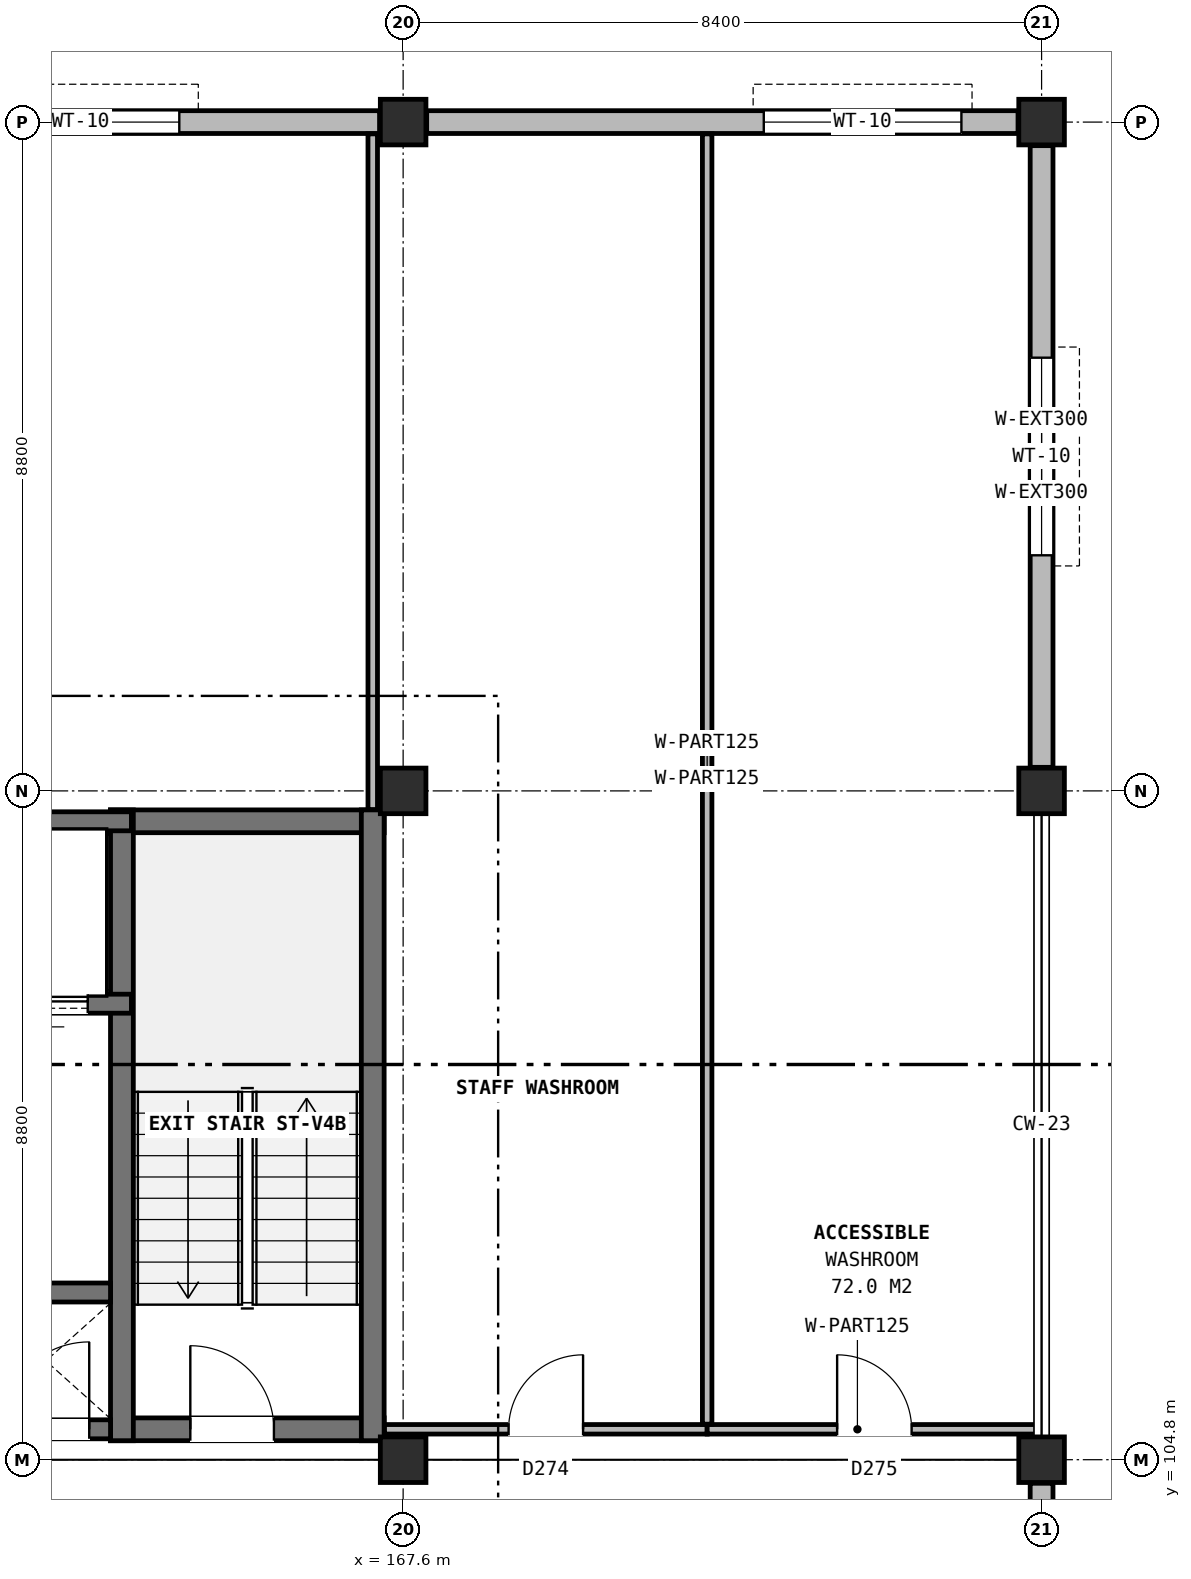
"""IFC4 building model, lengths in metres.
Left out: names, types, materials, properties, quantities, classifications, styles, units other than length and angle.
Written with IfcOpenShell. Run it as: python <this file> out.ifc"""

import sys

from ifc_helpers import new_model, si_unit, direction, frame, frame_2d, origin, origin_2d, place, context, subcontext, project, spatial, rectangle, extrude, element, fill, save


model = new_model("IFC4")
c1 = context("Model", 3, precision=1e-05, world=origin(), true_north=direction((0.0, 1.0)))
c2 = subcontext(c1, "Body", "Model", "MODEL_VIEW")
j1 = project(units=[si_unit("LENGTHUNIT", "METRE"), si_unit("PLANEANGLEUNIT", "RADIAN")], contexts=[c1])
p1 = place(None, origin())
s1 = spatial("IfcSite", under=j1, at=p1, CompositionType="ELEMENT")
p2 = place(p1, origin())
s2 = spatial("IfcBuilding", under=s1, at=p2, CompositionType="ELEMENT")
p3 = place(p2, frame((0.0, 0.0, 56.0)))
s3 = spatial("IfcBuildingStorey", under=s2, at=p3, CompositionType="ELEMENT", Elevation=56.0)
for number, where, z_axis, x_axis in (
    (1, (167.6, 104.8, 0.0), (0.0, 0.0, 1.0), (1.0, 0.0, 0.0)),
    (2, (167.6, 113.6, 0.0), (0.0, 0.0, 1.0), (1.0, 0.0, 0.0)),
    (3, (167.6, 122.4, 0.0), (0.0, 0.0, 1.0), (1.0, 0.0, 0.0)),
    (4, (176.0, 104.8, 0.0), (0.0, 0.0, 1.0), (1.0, 0.0, 0.0)),
    (5, (176.0, 113.6, 0.0), (0.0, 0.0, 1.0), (1.0, 0.0, 0.0)),
    (6, (176.0, 122.4, 0.0), (0.0, 0.0, 1.0), (1.0, 0.0, 0.0)),
):
    element("IfcColumn", number, at=place(p3, frame(where, z_axis=z_axis, x_axis=x_axis)), inside=s3, PredefinedType="COLUMN", context=c2, shape_type="SweptSolid", body=[
        extrude(rectangle(XDim=0.6, YDim=0.6, at=origin_2d()), origin(), (0.0, 0.0, 1.0), 3.8),
    ])
p4 = place(p3, frame((176.0, 96.31, 0.0), z_axis=(0.0, 0.0, 1.0), x_axis=(0.0, 1.0, 0.0)))
e7 = element("IfcWall", 7, at=p4, inside=s3, PredefinedType="SOLIDWALL", context=c2, shape_type="SweptSolid", body=[
    extrude(rectangle(XDim=8.18, YDim=0.3, at=frame_2d((4.09, 0.0))), origin(), (0.0, 0.0, 1.0), 3.05),
])
p5 = place(p4, frame((1.745, 0.0, 0.9)))
e8 = element("IfcOpeningElement", 8, at=p5, cuts=e7, PredefinedType="OPENING", context=c2, shape_type="SweptSolid", body=[
    extrude(rectangle(XDim=2.6, YDim=2.0, at=frame_2d((1.3, 1.0))), frame((0.0, 0.16, 0.0), z_axis=(0.0, -1.0, 0.0), x_axis=(1.0, 0.0, 0.0)), (0.0, 0.0, 1.0), 0.32),
])
p6 = place(p3, frame((176.0, 113.91, 0.0), z_axis=(0.0, 0.0, 1.0), x_axis=(0.0, 1.0, 0.0)))
e9 = element("IfcWall", 9, at=p6, inside=s3, PredefinedType="SOLIDWALL", context=c2, shape_type="SweptSolid", body=[
    extrude(rectangle(XDim=8.18, YDim=0.3, at=frame_2d((4.09, 0.0))), origin(), (0.0, 0.0, 1.0), 3.05),
])
p7 = place(p6, frame((2.79, 0.0, 0.9)))
e10 = element("IfcOpeningElement", 10, at=p7, cuts=e9, PredefinedType="OPENING", context=c2, shape_type="SweptSolid", body=[
    extrude(rectangle(XDim=2.6, YDim=2.0, at=frame_2d((1.3, 1.0))), frame((0.0, 0.16, 0.0), z_axis=(0.0, -1.0, 0.0), x_axis=(1.0, 0.0, 0.0)), (0.0, 0.0, 1.0), 0.32),
])
p8 = place(p3, frame((175.69, 122.4, 0.0), z_axis=(0.0, 0.0, 1.0), x_axis=(-1.0, 0.0, 0.0)))
e11 = element("IfcWall", 11, at=p8, inside=s3, PredefinedType="SOLIDWALL", context=c2, shape_type="SweptSolid", body=[
    extrude(rectangle(XDim=7.78, YDim=0.3, at=frame_2d((3.89, 0.0))), origin(), (0.0, 0.0, 1.0), 3.05),
])
p9 = place(p8, frame((0.745, 0.0, 0.9)))
e12 = element("IfcOpeningElement", 12, at=p9, cuts=e11, PredefinedType="OPENING", context=c2, shape_type="SweptSolid", body=[
    extrude(rectangle(XDim=2.6, YDim=2.0, at=frame_2d((1.3, 1.0))), frame((0.0, 0.16, 0.0), z_axis=(0.0, -1.0, 0.0), x_axis=(1.0, 0.0, 0.0)), (0.0, 0.0, 1.0), 0.32),
])
p10 = place(p3, frame((167.29, 122.4, 0.0), z_axis=(0.0, 0.0, 1.0), x_axis=(-1.0, 0.0, 0.0)))
e13 = element("IfcWall", 13, at=p10, inside=s3, PredefinedType="SOLIDWALL", context=c2, shape_type="SweptSolid", body=[
    extrude(rectangle(XDim=7.78, YDim=0.3, at=frame_2d((3.89, 0.0))), origin(), (0.0, 0.0, 1.0), 3.05),
])
p11 = place(p10, frame((2.635, 0.0, 0.9)))
e14 = element("IfcOpeningElement", 14, at=p11, cuts=e13, PredefinedType="OPENING", context=c2, shape_type="SweptSolid", body=[
    extrude(rectangle(XDim=2.6, YDim=2.0, at=frame_2d((1.3, 1.0))), frame((0.0, 0.16, 0.0), z_axis=(0.0, -1.0, 0.0), x_axis=(1.0, 0.0, 0.0)), (0.0, 0.0, 1.0), 0.32),
])
p12 = place(p3, frame((163.75, 105.2, 0.0), z_axis=(0.0, 0.0, 1.0), x_axis=(1.0, 0.0, 0.0)))
e15 = element("IfcWall", 15, at=p12, inside=s3, PredefinedType="SHEAR", context=c2, shape_type="SweptSolid", body=[
    extrude(rectangle(XDim=3.6, YDim=0.3, at=frame_2d((1.8, 0.0))), origin(), (0.0, 0.0, 1.0), 3.8),
])
p13 = place(p12, frame((1.05, 0.0, 0.0)))
e16 = element("IfcOpeningElement", 16, at=p13, cuts=e15, PredefinedType="OPENING", context=c2, shape_type="SweptSolid", body=[
    extrude(rectangle(XDim=1.1, YDim=2.2, at=frame_2d((0.55, 1.1))), frame((0.0, 0.16, 0.0), z_axis=(0.0, -1.0, 0.0), x_axis=(1.0, 0.0, 0.0)), (0.0, 0.0, 1.0), 0.32),
])
p14 = place(p3, frame((163.75, 113.2, 0.0), z_axis=(0.0, 0.0, 1.0), x_axis=(1.0, 0.0, 0.0)))
e17 = element("IfcWall", 17, at=p14, inside=s3, PredefinedType="SHEAR", context=c2, shape_type="SweptSolid", body=[
    extrude(rectangle(XDim=3.6, YDim=0.3, at=frame_2d((1.8, 0.0))), origin(), (0.0, 0.0, 1.0), 3.8),
])
for number, where, z_axis, x_axis in (
    (18, (163.9, 105.05, 0.0), (0.0, 0.0, 1.0), (0.0, 1.0, 0.0)),
    (19, (167.2, 105.05, 0.0), (0.0, 0.0, 1.0), (0.0, 1.0, 0.0)),
):
    element("IfcWall", number, at=place(p3, frame(where, z_axis=z_axis, x_axis=x_axis)), inside=s3, PredefinedType="SHEAR", context=c2, shape_type="SweptSolid", body=[
        extrude(rectangle(XDim=8.3, YDim=0.3, at=frame_2d((4.15, 0.0))), origin(), (0.0, 0.0, 1.0), 3.8),
    ])
p15 = place(p3, frame((161.475, 110.8, 0.0), z_axis=(0.0, 0.0, 1.0), x_axis=(1.0, 0.0, 0.0)))
e20 = element("IfcWall", 20, at=p15, inside=s3, PredefinedType="SOLIDWALL", context=c2, shape_type="SweptSolid", body=[
    extrude(rectangle(XDim=2.55, YDim=0.25, at=frame_2d((1.275, 0.0))), origin(), (0.0, 0.0, 1.0), 3.48),
])
p16 = place(p15, frame((0.575, 0.0, 0.0)))
e21 = element("IfcOpeningElement", 21, at=p16, cuts=e20, PredefinedType="OPENING", context=c2, shape_type="SweptSolid", body=[
    extrude(rectangle(XDim=1.4, YDim=2.3, at=frame_2d((0.7, 1.15))), frame((0.0, 0.135, 0.0), z_axis=(0.0, -1.0, 0.0), x_axis=(1.0, 0.0, 0.0)), (0.0, 0.0, 1.0), 0.27),
])
p17 = place(p3, frame((161.475, 113.2, 0.0), z_axis=(0.0, 0.0, 1.0), x_axis=(1.0, 0.0, 0.0)))
e22 = element("IfcWall", 22, at=p17, inside=s3, PredefinedType="SOLIDWALL", context=c2, shape_type="SweptSolid", body=[
    extrude(rectangle(XDim=2.55, YDim=0.25, at=frame_2d((1.275, 0.0))), origin(), (0.0, 0.0, 1.0), 3.48),
])
p18 = place(p3, frame((162.05, 107.0, 0.0), z_axis=(0.0, 0.0, 1.0), x_axis=(1.0, 0.0, 0.0)))
e23 = element("IfcWall", 23, at=p18, inside=s3, PredefinedType="SOLIDWALL", context=c2, shape_type="SweptSolid", body=[
    extrude(rectangle(XDim=1.7, YDim=0.25, at=frame_2d((0.85, 0.0))), origin(), (0.0, 0.0, 1.0), 3.48),
])
p19 = place(p3, frame((162.05, 105.2, 0.0), z_axis=(0.0, 0.0, 1.0), x_axis=(1.0, 0.0, 0.0)))
e24 = element("IfcWall", 24, at=p19, inside=s3, PredefinedType="SOLIDWALL", context=c2, shape_type="SweptSolid", body=[
    extrude(rectangle(XDim=1.7, YDim=0.25, at=frame_2d((0.85, 0.0))), origin(), (0.0, 0.0, 1.0), 3.48),
])
p20 = place(p19, frame((0.27, 0.0, 0.0)))
e25 = element("IfcOpeningElement", 25, at=p20, cuts=e24, PredefinedType="OPENING", context=c2, shape_type="SweptSolid", body=[
    extrude(rectangle(XDim=1.15, YDim=2.2, at=frame_2d((0.575, 1.1))), frame((0.0, 0.135, 0.0), z_axis=(0.0, -1.0, 0.0), x_axis=(1.0, 0.0, 0.0)), (0.0, 0.0, 1.0), 0.27),
])
p21 = place(p3, frame((167.355, 105.2, 0.0), z_axis=(0.0, 0.0, 1.0), x_axis=(1.0, 0.0, 0.0)))
e26 = element("IfcWall", 26, at=p21, inside=s3, PredefinedType="PARTITIONING", context=c2, shape_type="SweptSolid", body=[
    extrude(rectangle(XDim=4.245, YDim=0.125, at=frame_2d((2.123, 0.0))), origin(), (0.0, 0.0, 1.0), 3.045),
])
p22 = place(p21, frame((1.633, 0.0, 0.0)))
e27 = element("IfcOpeningElement", 27, at=p22, cuts=e26, PredefinedType="OPENING", context=c2, shape_type="SweptSolid", body=[
    extrude(rectangle(XDim=0.98, YDim=2.1, at=frame_2d((0.49, 1.05))), frame((0.0, 0.073, 0.0), z_axis=(0.0, -1.0, 0.0), x_axis=(1.0, 0.0, 0.0)), (0.0, 0.0, 1.0), 0.145),
])
p23 = place(p3, frame((171.6, 105.2, 0.0), z_axis=(0.0, 0.0, 1.0), x_axis=(1.0, 0.0, 0.0)))
e28 = element("IfcWall", 28, at=p23, inside=s3, PredefinedType="PARTITIONING", context=c2, shape_type="SweptSolid", body=[
    extrude(rectangle(XDim=4.4, YDim=0.125, at=frame_2d((2.2, 0.0))), origin(), (0.0, 0.0, 1.0), 3.045),
])
p24 = place(p23, frame((1.71, 0.0, 0.0)))
e29 = element("IfcOpeningElement", 29, at=p24, cuts=e28, PredefinedType="OPENING", context=c2, shape_type="SweptSolid", body=[
    extrude(rectangle(XDim=0.98, YDim=2.1, at=frame_2d((0.49, 1.05))), frame((0.0, 0.073, 0.0), z_axis=(0.0, -1.0, 0.0), x_axis=(1.0, 0.0, 0.0)), (0.0, 0.0, 1.0), 0.145),
])
p25 = place(p3, frame((167.2, 113.355, 0.0), z_axis=(0.0, 0.0, 1.0), x_axis=(0.0, 1.0, 0.0)))
e30 = element("IfcWall", 30, at=p25, inside=s3, PredefinedType="PARTITIONING", context=c2, shape_type="SweptSolid", body=[
    extrude(rectangle(XDim=8.89, YDim=0.125, at=frame_2d((4.445, 0.0))), origin(), (0.0, 0.0, 1.0), 3.045),
])
p26 = place(p3, frame((171.6, 105.268, 0.0), z_axis=(0.0, 0.0, 1.0), x_axis=(0.0, 1.0, 0.0)))
e31 = element("IfcWall", 31, at=p26, inside=s3, PredefinedType="PARTITIONING", context=c2, shape_type="SweptSolid", body=[
    extrude(rectangle(XDim=16.978, YDim=0.125, at=frame_2d((8.489, 0.0))), origin(), (0.0, 0.0, 1.0), 3.465),
])
p27 = place(p7, origin())
e32 = element("IfcWindow", 32, at=p27, inside=s3, PartitioningType="SINGLE_PANEL", PredefinedType="WINDOW", context=c2, shape_type="SweptSolid", body=[
    extrude(rectangle(XDim=2.6, YDim=2.0, at=frame_2d((1.3, 1.0))), frame((0.0, 0.03, 0.0), z_axis=(0.0, -1.0, 0.0), x_axis=(1.0, 0.0, 0.0)), (0.0, 0.0, 1.0), 0.06),
])
fill(e10, e32)
p28 = place(p9, origin())
e33 = element("IfcWindow", 33, at=p28, inside=s3, PartitioningType="SINGLE_PANEL", PredefinedType="WINDOW", context=c2, shape_type="SweptSolid", body=[
    extrude(rectangle(XDim=2.6, YDim=2.0, at=frame_2d((1.3, 1.0))), frame((0.0, 0.03, 0.0), z_axis=(0.0, -1.0, 0.0), x_axis=(1.0, 0.0, 0.0)), (0.0, 0.0, 1.0), 0.06),
])
fill(e12, e33)
p29 = place(p11, origin())
e34 = element("IfcWindow", 34, at=p29, inside=s3, PartitioningType="SINGLE_PANEL", PredefinedType="WINDOW", context=c2, shape_type="SweptSolid", body=[
    extrude(rectangle(XDim=2.6, YDim=2.0, at=frame_2d((1.3, 1.0))), frame((0.0, 0.03, 0.0), z_axis=(0.0, -1.0, 0.0), x_axis=(1.0, 0.0, 0.0)), (0.0, 0.0, 1.0), 0.06),
])
fill(e14, e34)
p30 = place(p13, origin())
e35 = element("IfcDoor", 35, at=p30, inside=s3, OperationType="SINGLE_SWING_LEFT", PredefinedType="DOOR", context=c2, shape_type="SweptSolid", body=[
    extrude(rectangle(XDim=1.1, YDim=2.2, at=frame_2d((0.55, 1.1))), frame((0.0, 0.025, 0.0), z_axis=(0.0, -1.0, 0.0), x_axis=(1.0, 0.0, 0.0)), (0.0, 0.0, 1.0), 0.05),
])
fill(e16, e35)
p31 = place(p16, origin())
e36 = element("IfcDoor", 36, at=p31, inside=s3, OperationType="SLIDING_TO_LEFT", PredefinedType="DOOR", context=c2, shape_type="SweptSolid", body=[
    extrude(rectangle(XDim=1.4, YDim=2.3, at=frame_2d((0.7, 1.15))), frame((0.0, 0.025, 0.0), z_axis=(0.0, -1.0, 0.0), x_axis=(1.0, 0.0, 0.0)), (0.0, 0.0, 1.0), 0.05),
])
fill(e21, e36)
p32 = place(p20, origin())
e37 = element("IfcDoor", 37, at=p32, inside=s3, OperationType="SINGLE_SWING_RIGHT", PredefinedType="DOOR", context=c2, shape_type="SweptSolid", body=[
    extrude(rectangle(XDim=1.15, YDim=2.2, at=frame_2d((0.575, 1.1))), frame((0.0, 0.025, 0.0), z_axis=(0.0, -1.0, 0.0), x_axis=(1.0, 0.0, 0.0)), (0.0, 0.0, 1.0), 0.05),
])
fill(e25, e37)
p33 = place(p22, origin())
e38 = element("IfcDoor", 38, at=p33, inside=s3, OperationType="SINGLE_SWING_RIGHT", PredefinedType="DOOR", context=c2, shape_type="SweptSolid", body=[
    extrude(rectangle(XDim=0.98, YDim=2.1, at=frame_2d((0.49, 1.05))), frame((0.0, 0.025, 0.0), z_axis=(0.0, -1.0, 0.0), x_axis=(1.0, 0.0, 0.0)), (0.0, 0.0, 1.0), 0.05),
])
fill(e27, e38)
p34 = place(p24, origin())
e39 = element("IfcDoor", 39, at=p34, inside=s3, OperationType="SINGLE_SWING_LEFT", PredefinedType="DOOR", context=c2, shape_type="SweptSolid", body=[
    extrude(rectangle(XDim=0.98, YDim=2.1, at=frame_2d((0.49, 1.05))), frame((0.0, 0.025, 0.0), z_axis=(0.0, -1.0, 0.0), x_axis=(1.0, 0.0, 0.0)), (0.0, 0.0, 1.0), 0.05),
])
fill(e29, e39)
save(model, sys.argv[1])
